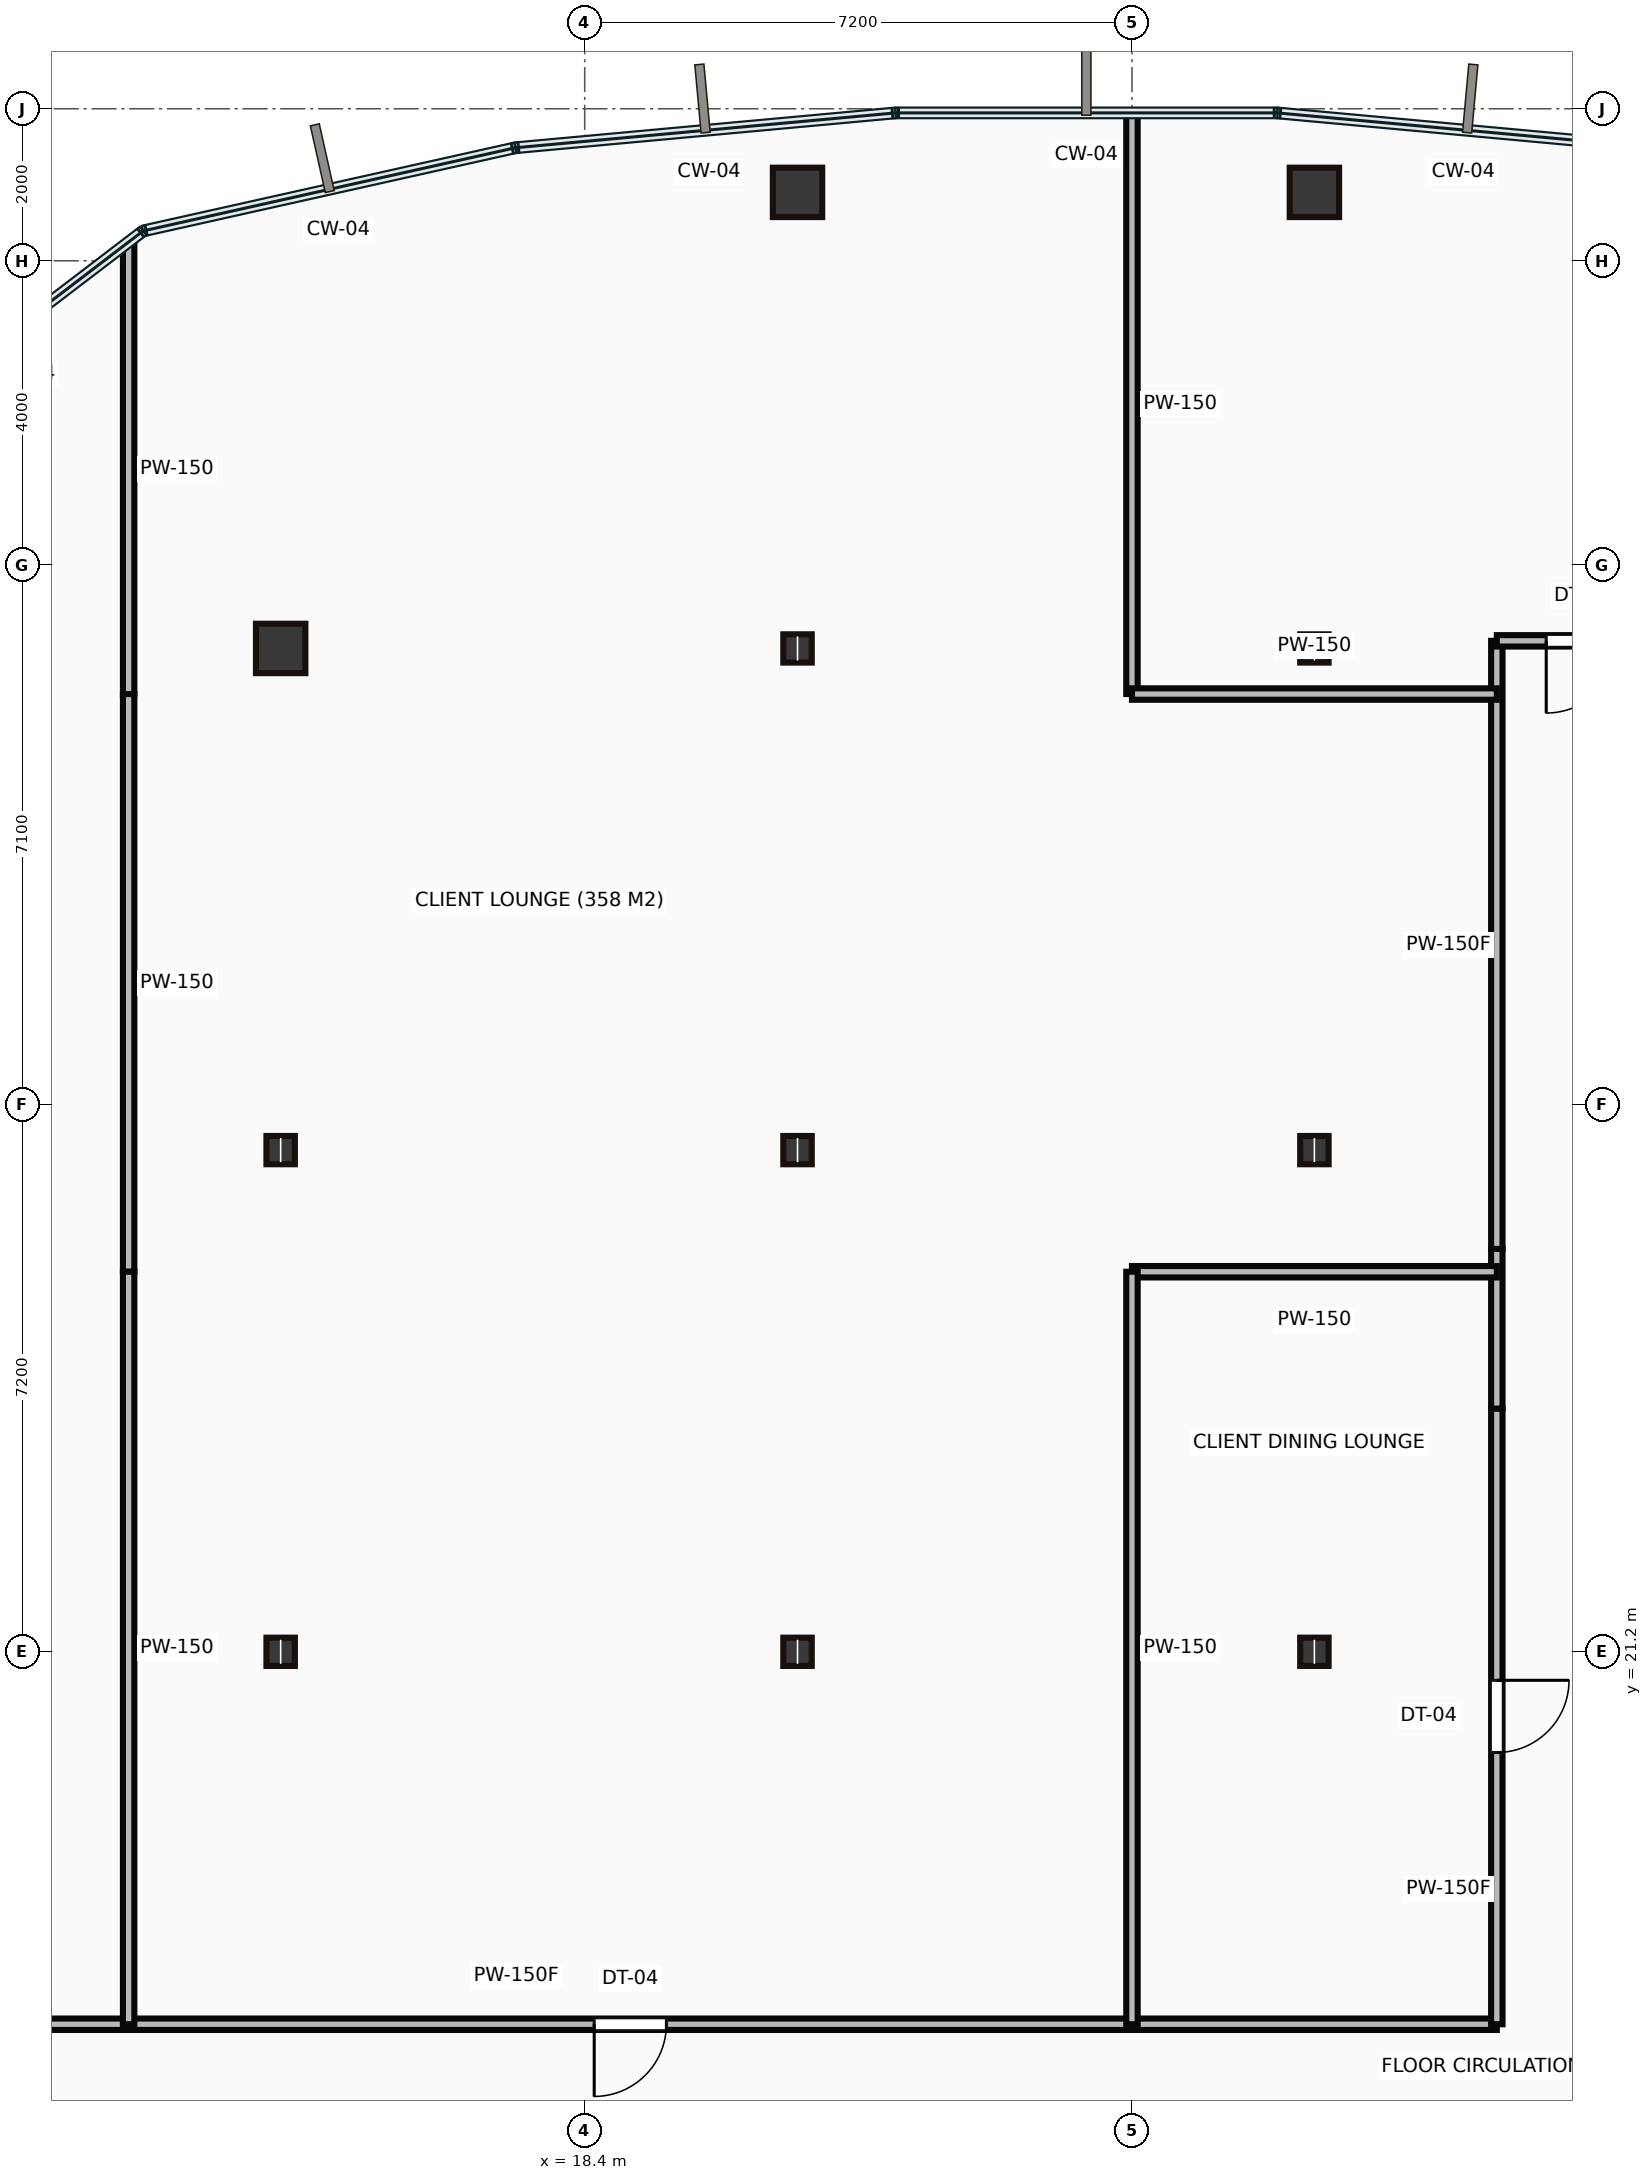
"""IFC4 building model, lengths in metres.
Left out: names, types, materials, properties, quantities, classifications, styles, units other than length and angle.
Written with IfcOpenShell. Run it as: python <this file> out.ifc"""

import sys

from ifc_helpers import new_model, si_unit, direction, frame, frame_2d, origin, origin_2d, place, context, subcontext, project, spatial, rectangle, hollow_rectangle, i_section, extrude, source, transform, mapped, element, fill, save


model = new_model("IFC4")
c1 = context("Model", 3, precision=1e-05, world=origin(), true_north=direction((0.0, 1.0)))
c2 = subcontext(c1, "Body", "Model", "MODEL_VIEW")
j1 = project(units=[si_unit("LENGTHUNIT", "METRE"), si_unit("PLANEANGLEUNIT", "RADIAN")], contexts=[c1])
p1 = place(None, origin())
s1 = spatial("IfcSite", under=j1, at=p1, CompositionType="ELEMENT")
p2 = place(p1, origin())
s2 = spatial("IfcBuilding", under=s1, at=p2, CompositionType="ELEMENT")
p3 = place(p2, frame((0.0, 0.0, 180.75)))
s3 = spatial("IfcBuildingStorey", under=s2, at=p3, CompositionType="ELEMENT", Elevation=180.75)
m1 = source(origin(), c2, "Body", "SweptSolid", [
    extrude(i_section(OverallWidth=0.374, OverallDepth=0.372, WebThickness=0.016, FlangeThickness=0.026, at=origin_2d()), origin(), (0.0, 0.0, 1.0), 3.65),
])
for number, where, z_axis, x_axis in (
    (1, (14.4, 21.2, 0.0), (0.0, 0.0, 1.0), (1.0, 0.0, 0.0)),
    (2, (14.4, 27.8, 0.0), (0.0, 0.0, 1.0), (1.0, 0.0, 0.0)),
):
    element("IfcColumn", number, at=place(p3, frame(where, z_axis=z_axis, x_axis=x_axis)), inside=s3, PredefinedType="COLUMN", context=c2, shape_type="MappedRepresentation", body=[
        mapped(m1, transform((0.0, 0.0, 0.0))),
    ])
m2 = source(origin(), c2, "Body", "SweptSolid", [
    extrude(hollow_rectangle(XDim=0.65, YDim=0.65, WallThickness=0.032, at=origin_2d()), origin(), (0.0, 0.0, 1.0), 3.65),
])
p4 = place(p3, frame((14.4, 34.4, 0.0), z_axis=(0.0, 0.0, 1.0), x_axis=(1.0, 0.0, 0.0)))
e3 = element("IfcColumn", 3, at=p4, inside=s3, PredefinedType="COLUMN", context=c2, shape_type="MappedRepresentation", body=[
    mapped(m2, transform((0.0, 0.0, 0.0))),
])
for number, where, z_axis, x_axis in (
    (4, (21.2, 21.2, 0.0), (0.0, 0.0, 1.0), (1.0, 0.0, 0.0)),
    (5, (21.2, 27.8, 0.0), (0.0, 0.0, 1.0), (1.0, 0.0, 0.0)),
    (6, (21.2, 34.4, 0.0), (0.0, 0.0, 1.0), (1.0, 0.0, 0.0)),
):
    element("IfcColumn", number, at=place(p3, frame(where, z_axis=z_axis, x_axis=x_axis)), inside=s3, PredefinedType="COLUMN", context=c2, shape_type="MappedRepresentation", body=[
        mapped(m1, transform((0.0, 0.0, 0.0))),
    ])
p5 = place(p3, frame((21.2, 40.4, 0.0), z_axis=(0.0, 0.0, 1.0), x_axis=(1.0, 0.0, 0.0)))
e7 = element("IfcColumn", 7, at=p5, inside=s3, PredefinedType="COLUMN", context=c2, shape_type="MappedRepresentation", body=[
    mapped(m2, transform((0.0, 0.0, 0.0))),
])
for number, where, z_axis, x_axis in (
    (8, (28.0, 21.2, 0.0), (0.0, 0.0, 1.0), (1.0, 0.0, 0.0)),
    (9, (28.0, 27.8, 0.0), (0.0, 0.0, 1.0), (1.0, 0.0, 0.0)),
    (10, (28.0, 34.4, 0.0), (0.0, 0.0, 1.0), (1.0, 0.0, 0.0)),
):
    element("IfcColumn", number, at=place(p3, frame(where, z_axis=z_axis, x_axis=x_axis)), inside=s3, PredefinedType="COLUMN", context=c2, shape_type="MappedRepresentation", body=[
        mapped(m1, transform((0.0, 0.0, 0.0))),
    ])
p6 = place(p3, frame((28.0, 40.4, 0.0), z_axis=(0.0, 0.0, 1.0), x_axis=(1.0, 0.0, 0.0)))
e11 = element("IfcColumn", 11, at=p6, inside=s3, PredefinedType="COLUMN", context=c2, shape_type="MappedRepresentation", body=[
    mapped(m2, transform((0.0, 0.0, 0.0))),
])
m3 = source(origin(), c2, "Body", "SweptSolid", [
    extrude(rectangle(XDim=25.8, YDim=0.15, at=frame_2d((12.9, 0.0))), origin(), (0.0, 0.0, 1.0), 3.4),
])
p7 = place(p3, frame((4.6, 16.3, 0.0), z_axis=(0.0, 0.0, 1.0), x_axis=(1.0, 0.0, 0.0)))
e12 = element("IfcWall", 12, at=p7, inside=s3, PredefinedType="PARTITIONING", context=c2, shape_type="MappedRepresentation", body=[
    mapped(m3, transform((0.0, 0.0, 0.0))),
])
p8 = place(p7, frame((3.555, 0.0, 0.0)))
e13 = element("IfcOpeningElement", 13, at=p8, cuts=e12, PredefinedType="OPENING", context=c2, shape_type="SweptSolid", body=[
    extrude(rectangle(XDim=0.95, YDim=2.15, at=frame_2d((0.475, 1.075))), frame((0.0, 0.085, 0.0), z_axis=(0.0, -1.0, 0.0), x_axis=(1.0, 0.0, 0.0)), (0.0, 0.0, 1.0), 0.17),
])
p9 = place(p7, frame((13.925, 0.0, 0.0)))
e14 = element("IfcOpeningElement", 14, at=p9, cuts=e12, PredefinedType="OPENING", context=c2, shape_type="SweptSolid", body=[
    extrude(rectangle(XDim=0.95, YDim=2.15, at=frame_2d((0.475, 1.075))), frame((0.0, 0.085, 0.0), z_axis=(0.0, -1.0, 0.0), x_axis=(1.0, 0.0, 0.0)), (0.0, 0.0, 1.0), 0.17),
])
m4 = source(origin(), c2, "Body", "SweptSolid", [
    extrude(rectangle(XDim=8.1, YDim=0.15, at=frame_2d((4.05, 0.0))), origin(), (0.0, 0.0, 1.0), 3.4),
])
p10 = place(p3, frame((30.4, 16.3, 0.0), z_axis=(0.0, 0.0, 1.0), x_axis=(0.0, 1.0, 0.0)))
e15 = element("IfcWall", 15, at=p10, inside=s3, PredefinedType="PARTITIONING", context=c2, shape_type="MappedRepresentation", body=[
    mapped(m4, transform((0.0, 0.0, 0.0))),
])
p11 = place(p10, frame((3.575, 0.0, 0.0)))
e16 = element("IfcOpeningElement", 16, at=p11, cuts=e15, PredefinedType="OPENING", context=c2, shape_type="SweptSolid", body=[
    extrude(rectangle(XDim=0.95, YDim=2.15, at=frame_2d((0.475, 1.075))), frame((0.0, 0.085, 0.0), z_axis=(0.0, -1.0, 0.0), x_axis=(1.0, 0.0, 0.0)), (0.0, 0.0, 1.0), 0.17),
])
m5 = source(origin(), c2, "Body", "SweptSolid", [
    extrude(rectangle(XDim=2.1, YDim=0.15, at=frame_2d((1.05, 0.0))), origin(), (0.0, 0.0, 1.0), 3.4),
])
p12 = place(p3, frame((30.4, 24.4, 0.0), z_axis=(0.0, 0.0, 1.0), x_axis=(0.0, 1.0, 0.0)))
e17 = element("IfcWall", 17, at=p12, inside=s3, PredefinedType="PARTITIONING", context=c2, shape_type="MappedRepresentation", body=[
    mapped(m5, transform((0.0, 0.0, 0.0))),
])
m6 = source(origin(), c2, "Body", "SweptSolid", [
    extrude(rectangle(XDim=8.0, YDim=0.15, at=frame_2d((4.0, 0.0))), origin(), (0.0, 0.0, 1.0), 3.4),
])
p13 = place(p3, frame((30.4, 26.5, 0.0), z_axis=(0.0, 0.0, 1.0), x_axis=(0.0, 1.0, 0.0)))
e18 = element("IfcWall", 18, at=p13, inside=s3, PredefinedType="PARTITIONING", context=c2, shape_type="MappedRepresentation", body=[
    mapped(m6, transform((0.0, 0.0, 0.0))),
])
m7 = source(origin(), c2, "Body", "SweptSolid", [
    extrude(rectangle(XDim=2.25, YDim=0.15, at=frame_2d((1.125, 0.0))), origin(), (0.0, 0.0, 1.0), 2.76),
])
p14 = place(p3, frame((30.4, 34.5, 0.0), z_axis=(0.0, 0.0, 1.0), x_axis=(1.0, 0.0, 0.0)))
e19 = element("IfcWall", 19, at=p14, inside=s3, PredefinedType="PARTITIONING", context=c2, shape_type="MappedRepresentation", body=[
    mapped(m7, transform((0.0, 0.0, 0.0))),
])
p15 = place(p14, frame((0.65, 0.0, 0.0)))
e20 = element("IfcOpeningElement", 20, at=p15, cuts=e19, PredefinedType="OPENING", context=c2, shape_type="SweptSolid", body=[
    extrude(rectangle(XDim=0.95, YDim=2.15, at=frame_2d((0.475, 1.075))), frame((0.0, 0.085, 0.0), z_axis=(0.0, -1.0, 0.0), x_axis=(1.0, 0.0, 0.0)), (0.0, 0.0, 1.0), 0.17),
])
m8 = source(origin(), c2, "Body", "SweptSolid", [
    extrude(rectangle(XDim=5.922, YDim=0.15, at=frame_2d((2.961, 0.0))), origin(), (0.0, 0.0, 1.0), 3.4),
])
p16 = place(p3, frame((12.4, 39.722, 0.0), z_axis=(0.0, 0.0, 1.0), x_axis=(0.0, -1.0, 0.0)))
e21 = element("IfcWall", 21, at=p16, inside=s3, PredefinedType="PARTITIONING", context=c2, shape_type="MappedRepresentation", body=[
    mapped(m8, transform((0.0, 0.0, 0.0))),
])
m9 = source(origin(), c2, "Body", "SweptSolid", [
    extrude(rectangle(XDim=7.6, YDim=0.15, at=frame_2d((3.8, 0.0))), origin(), (0.0, 0.0, 1.0), 3.4),
])
p17 = place(p3, frame((12.4, 33.8, 0.0), z_axis=(0.0, 0.0, 1.0), x_axis=(0.0, -1.0, 0.0)))
e22 = element("IfcWall", 22, at=p17, inside=s3, PredefinedType="PARTITIONING", context=c2, shape_type="MappedRepresentation", body=[
    mapped(m9, transform((0.0, 0.0, 0.0))),
])
m10 = source(origin(), c2, "Body", "SweptSolid", [
    extrude(rectangle(XDim=9.9, YDim=0.15, at=frame_2d((4.95, 0.0))), origin(), (0.0, 0.0, 1.0), 3.4),
])
p18 = place(p3, frame((12.4, 26.2, 0.0), z_axis=(0.0, 0.0, 1.0), x_axis=(0.0, -1.0, 0.0)))
e23 = element("IfcWall", 23, at=p18, inside=s3, PredefinedType="PARTITIONING", context=c2, shape_type="MappedRepresentation", body=[
    mapped(m10, transform((0.0, 0.0, 0.0))),
])
m11 = source(origin(), c2, "Body", "SweptSolid", [
    extrude(rectangle(XDim=4.8, YDim=0.15, at=frame_2d((2.4, 0.0))), origin(), (0.0, 0.0, 1.0), 3.4),
])
p19 = place(p3, frame((30.4, 26.2, 0.0), z_axis=(0.0, 0.0, 1.0), x_axis=(-1.0, 0.0, 0.0)))
e24 = element("IfcWall", 24, at=p19, inside=s3, PredefinedType="PARTITIONING", context=c2, shape_type="MappedRepresentation", body=[
    mapped(m11, transform((0.0, 0.0, 0.0))),
])
p20 = place(p3, frame((25.6, 26.2, 0.0), z_axis=(0.0, 0.0, 1.0), x_axis=(0.0, -1.0, 0.0)))
e25 = element("IfcWall", 25, at=p20, inside=s3, PredefinedType="PARTITIONING", context=c2, shape_type="MappedRepresentation", body=[
    mapped(m10, transform((0.0, 0.0, 0.0))),
])
m12 = source(origin(), c2, "Body", "SweptSolid", [
    extrude(rectangle(XDim=7.625, YDim=0.15, at=frame_2d((3.813, 0.0))), origin(), (0.0, 0.0, 1.0), 3.4),
])
p21 = place(p3, frame((25.6, 41.426, 0.0), z_axis=(0.0, 0.0, 1.0), x_axis=(0.0, -1.0, 0.0)))
e26 = element("IfcWall", 26, at=p21, inside=s3, PredefinedType="PARTITIONING", context=c2, shape_type="MappedRepresentation", body=[
    mapped(m12, transform((0.0, 0.0, 0.0))),
])
p22 = place(p3, frame((25.6, 33.8, 0.0), z_axis=(0.0, 0.0, 1.0), x_axis=(1.0, 0.0, 0.0)))
e27 = element("IfcWall", 27, at=p22, inside=s3, PredefinedType="PARTITIONING", context=c2, shape_type="MappedRepresentation", body=[
    mapped(m11, transform((0.0, 0.0, 0.0))),
])
m13 = source(origin(), c2, "Body", "SweptSolid", [
    extrude(rectangle(XDim=0.95, YDim=2.15, at=frame_2d((0.475, 1.075))), frame((0.0, 0.025, 0.0), z_axis=(0.0, -1.0, 0.0), x_axis=(1.0, 0.0, 0.0)), (0.0, 0.0, 1.0), 0.05),
])
p23 = place(p9, origin())
e28 = element("IfcDoor", 28, at=p23, inside=s3, OperationType="SINGLE_SWING_LEFT", PredefinedType="DOOR", context=c2, shape_type="MappedRepresentation", body=[
    mapped(m13, transform((0.0, 0.0, 0.0))),
])
fill(e14, e28)
p24 = place(p11, origin())
e29 = element("IfcDoor", 29, at=p24, inside=s3, OperationType="SINGLE_SWING_RIGHT", PredefinedType="DOOR", context=c2, shape_type="MappedRepresentation", body=[
    mapped(m13, transform((0.0, 0.0, 0.0))),
])
fill(e16, e29)
p25 = place(p15, origin())
e30 = element("IfcDoor", 30, at=p25, inside=s3, OperationType="SINGLE_SWING_LEFT", PredefinedType="DOOR", context=c2, shape_type="MappedRepresentation", body=[
    mapped(m13, transform((0.0, 0.0, 0.0))),
])
fill(e20, e30)
save(model, sys.argv[1])
